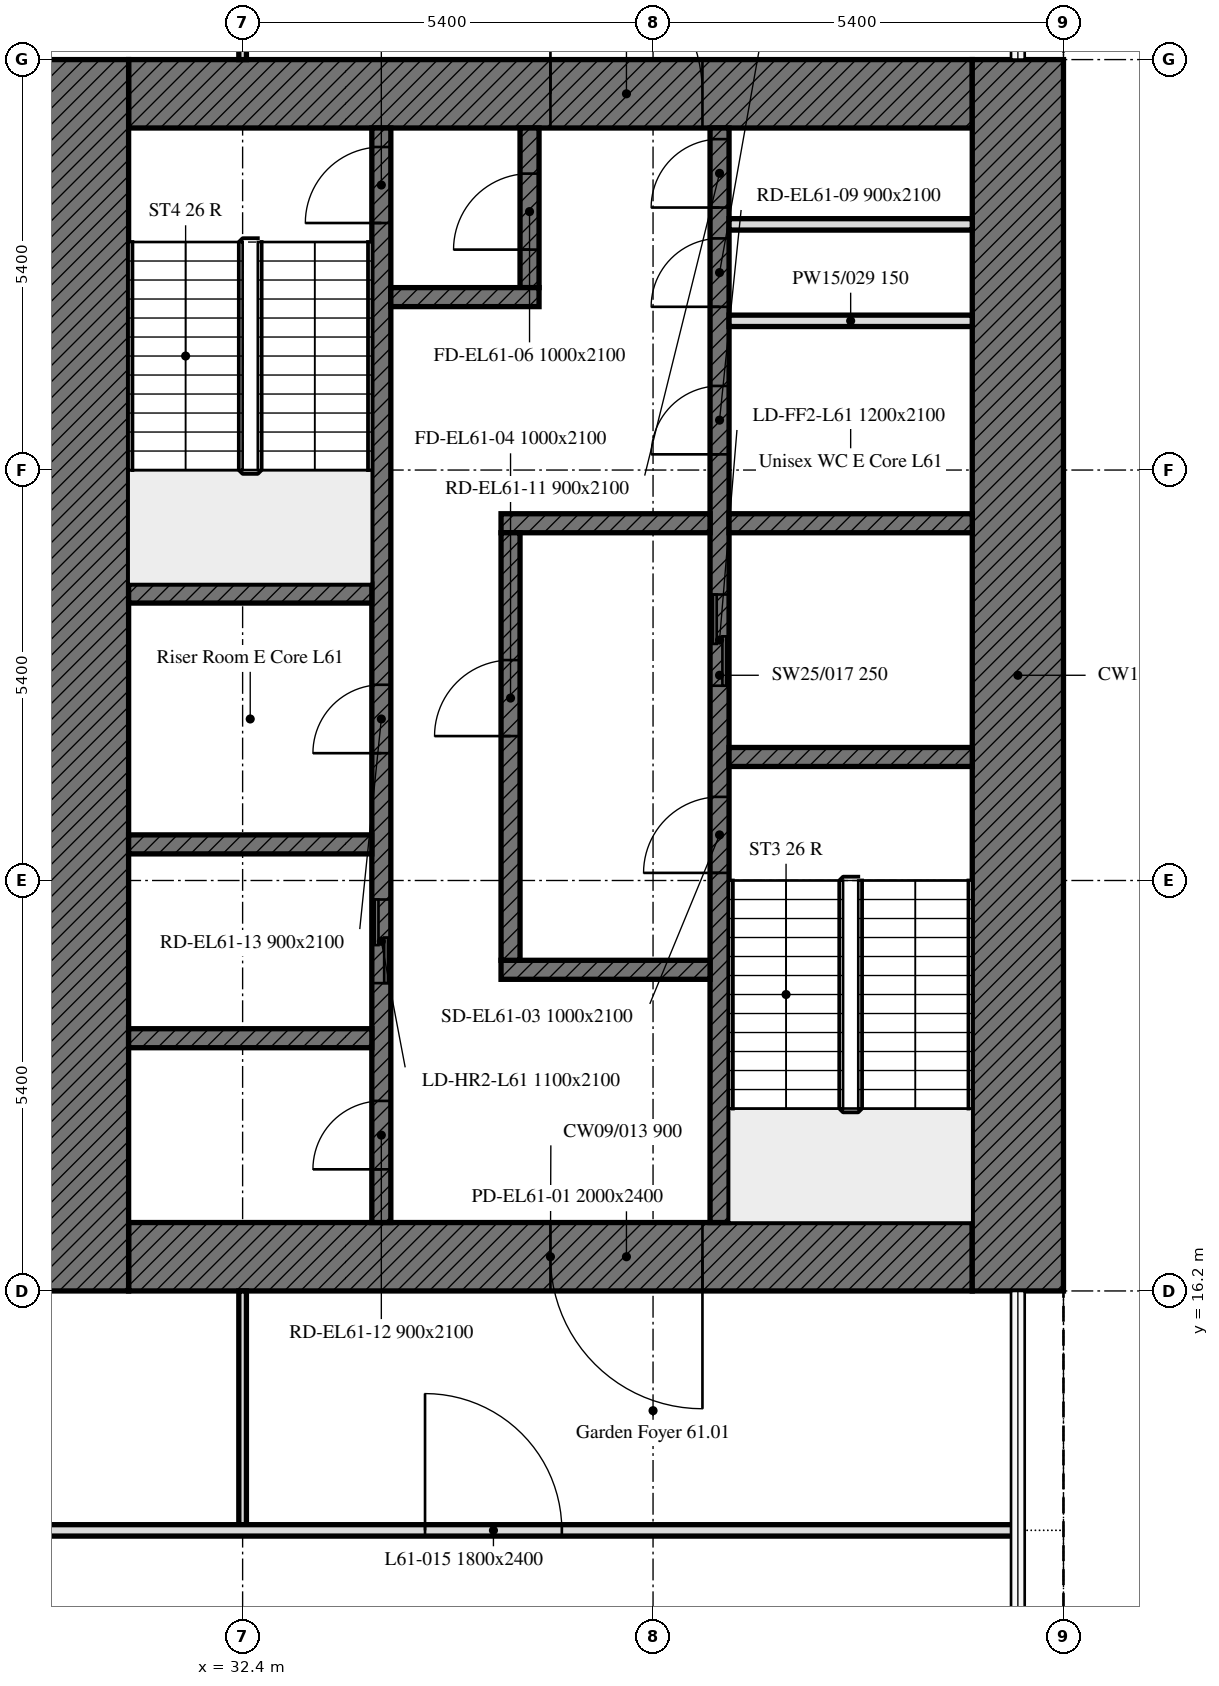
"""IFC4 building model, lengths in metres.
Left out: names, types, materials, properties, quantities, classifications, styles, units other than length and angle.
Written with IfcOpenShell. Run it as: python <this file> out.ifc"""

import sys

from ifc_helpers import new_model, si_unit, direction, frame, frame_2d, origin, place, context, subcontext, project, spatial, rectangle, extrude, element, fill, save


model = new_model("IFC4")
c1 = context("Model", 3, precision=1e-05, world=origin(), true_north=direction((0.0, 1.0)))
c2 = subcontext(c1, "Body", "Model", "MODEL_VIEW")
j1 = project(units=[si_unit("LENGTHUNIT", "METRE"), si_unit("PLANEANGLEUNIT", "RADIAN")], contexts=[c1])
p1 = place(None, origin())
s1 = spatial("IfcSite", under=j1, at=p1, CompositionType="ELEMENT")
p2 = place(p1, origin())
s2 = spatial("IfcBuilding", under=s1, at=p2, CompositionType="ELEMENT")
p3 = place(p2, frame((0.0, 0.0, 250.9)))
s3 = spatial("IfcBuildingStorey", under=s2, at=p3, CompositionType="ELEMENT", Elevation=250.9)
p4 = place(p3, frame((42.0, 16.65, 0.0), z_axis=(0.0, 0.0, 1.0), x_axis=(-1.0, 0.0, 0.0)))
e1 = element("IfcWall", 1, at=p4, inside=s3, PredefinedType="SOLIDWALL", context=c2, shape_type="SweptSolid", body=[
    extrude(rectangle(XDim=11.1, YDim=0.9, at=frame_2d((5.55, 0.0))), origin(), (0.0, 0.0, 1.0), 4.5),
])
p5 = place(p4, frame((3.55, 0.0, 0.0)))
e2 = element("IfcOpeningElement", 2, at=p5, cuts=e1, PredefinedType="OPENING", context=c2, shape_type="SweptSolid", body=[
    extrude(rectangle(XDim=2.0, YDim=2.4, at=frame_2d((1.0, 1.2))), frame((0.0, 0.45, 0.0), z_axis=(0.0, -1.0, 0.0), x_axis=(1.0, 0.0, 0.0)), (0.0, 0.0, 1.0), 0.9),
])
p6 = place(p3, frame((30.9, 31.95, 0.0), z_axis=(0.0, 0.0, 1.0), x_axis=(1.0, 0.0, 0.0)))
e3 = element("IfcWall", 3, at=p6, inside=s3, PredefinedType="SOLIDWALL", context=c2, shape_type="SweptSolid", body=[
    extrude(rectangle(XDim=11.1, YDim=0.9, at=frame_2d((5.55, 0.0))), origin(), (0.0, 0.0, 1.0), 4.5),
])
p7 = place(p6, frame((5.55, 0.0, 0.0)))
e4 = element("IfcOpeningElement", 4, at=p7, cuts=e3, PredefinedType="OPENING", context=c2, shape_type="SweptSolid", body=[
    extrude(rectangle(XDim=2.0, YDim=2.4, at=frame_2d((1.0, 1.2))), frame((0.0, 0.45, 0.0), z_axis=(0.0, -1.0, 0.0), x_axis=(1.0, 0.0, 0.0)), (0.0, 0.0, 1.0), 0.9),
])
for number, where, z_axis, x_axis in (
    (5, (42.6, 32.4, 0.0), (0.0, 0.0, 1.0), (0.0, -1.0, 0.0)),
    (6, (30.3, 16.2, 0.0), (0.0, 0.0, 1.0), (0.0, 1.0, 0.0)),
):
    element("IfcWall", number, at=place(p3, frame(where, z_axis=z_axis, x_axis=x_axis)), inside=s3, PredefinedType="SOLIDWALL", context=c2, shape_type="SweptSolid", body=[
        extrude(rectangle(XDim=16.2, YDim=1.2, at=frame_2d((8.1, 0.0))), origin(), (0.0, 0.0, 1.0), 4.5),
    ])
p8 = place(p3, frame((38.675, 17.1, 0.0), z_axis=(0.0, 0.0, 1.0), x_axis=(0.0, 1.0, 0.0)))
e7 = element("IfcWall", 7, at=p8, inside=s3, PredefinedType="SOLIDWALL", context=c2, shape_type="SweptSolid", body=[
    extrude(rectangle(XDim=14.4, YDim=0.25, at=frame_2d((7.2, 0.0))), origin(), (0.0, 0.0, 1.0), 4.5),
])
p9 = place(p8, frame((4.6, 0.0, 0.0)))
e8 = element("IfcOpeningElement", 8, at=p9, cuts=e7, PredefinedType="OPENING", context=c2, shape_type="SweptSolid", body=[
    extrude(rectangle(XDim=1.0, YDim=2.1, at=frame_2d((0.5, 1.05))), frame((0.0, 0.125, 0.0), z_axis=(0.0, -1.0, 0.0), x_axis=(1.0, 0.0, 0.0)), (0.0, 0.0, 1.0), 0.25),
])
p10 = place(p8, frame((7.062, 0.0, 0.0)))
e9 = element("IfcOpeningElement", 9, at=p10, cuts=e7, PredefinedType="OPENING", context=c2, shape_type="SweptSolid", body=[
    extrude(rectangle(XDim=1.2, YDim=2.1, at=frame_2d((0.6, 1.05))), frame((0.0, 0.125, 0.0), z_axis=(0.0, -1.0, 0.0), x_axis=(1.0, 0.0, 0.0)), (0.0, 0.0, 1.0), 0.25),
])
p11 = place(p8, frame((10.106, 0.0, 0.0)))
e10 = element("IfcOpeningElement", 10, at=p11, cuts=e7, PredefinedType="OPENING", context=c2, shape_type="SweptSolid", body=[
    extrude(rectangle(XDim=0.9, YDim=2.1, at=frame_2d((0.45, 1.05))), frame((0.0, 0.125, 0.0), z_axis=(0.0, -1.0, 0.0), x_axis=(1.0, 0.0, 0.0)), (0.0, 0.0, 1.0), 0.25),
])
p12 = place(p8, frame((12.048, 0.0, 0.0)))
e11 = element("IfcOpeningElement", 11, at=p12, cuts=e7, PredefinedType="OPENING", context=c2, shape_type="SweptSolid", body=[
    extrude(rectangle(XDim=0.9, YDim=2.1, at=frame_2d((0.45, 1.05))), frame((0.0, 0.125, 0.0), z_axis=(0.0, -1.0, 0.0), x_axis=(1.0, 0.0, 0.0)), (0.0, 0.0, 1.0), 0.25),
])
p13 = place(p8, frame((13.354, 0.0, 0.0)))
e12 = element("IfcOpeningElement", 12, at=p13, cuts=e7, PredefinedType="OPENING", context=c2, shape_type="SweptSolid", body=[
    extrude(rectangle(XDim=0.9, YDim=2.1, at=frame_2d((0.45, 1.05))), frame((0.0, 0.125, 0.0), z_axis=(0.0, -1.0, 0.0), x_axis=(1.0, 0.0, 0.0)), (0.0, 0.0, 1.0), 0.25),
])
p14 = place(p3, frame((34.225, 17.1, 0.0), z_axis=(0.0, 0.0, 1.0), x_axis=(0.0, 1.0, 0.0)))
e13 = element("IfcWall", 13, at=p14, inside=s3, PredefinedType="SOLIDWALL", context=c2, shape_type="SweptSolid", body=[
    extrude(rectangle(XDim=14.4, YDim=0.25, at=frame_2d((7.2, 0.0))), origin(), (0.0, 0.0, 1.0), 4.5),
])
p15 = place(p14, frame((13.15, 0.0, 0.0)))
e14 = element("IfcOpeningElement", 14, at=p15, cuts=e13, PredefinedType="OPENING", context=c2, shape_type="SweptSolid", body=[
    extrude(rectangle(XDim=1.0, YDim=2.1, at=frame_2d((0.5, 1.05))), frame((0.0, 0.125, 0.0), z_axis=(0.0, -1.0, 0.0), x_axis=(1.0, 0.0, 0.0)), (0.0, 0.0, 1.0), 0.25),
])
p16 = place(p14, frame((3.15, 0.0, 0.0)))
e15 = element("IfcOpeningElement", 15, at=p16, cuts=e13, PredefinedType="OPENING", context=c2, shape_type="SweptSolid", body=[
    extrude(rectangle(XDim=1.1, YDim=2.1, at=frame_2d((0.55, 1.05))), frame((0.0, 0.125, 0.0), z_axis=(0.0, -1.0, 0.0), x_axis=(1.0, 0.0, 0.0)), (0.0, 0.0, 1.0), 0.25),
])
p17 = place(p14, frame((0.7, 0.0, 0.0)))
e16 = element("IfcOpeningElement", 16, at=p17, cuts=e13, PredefinedType="OPENING", context=c2, shape_type="SweptSolid", body=[
    extrude(rectangle(XDim=0.9, YDim=2.1, at=frame_2d((0.45, 1.05))), frame((0.0, 0.125, 0.0), z_axis=(0.0, -1.0, 0.0), x_axis=(1.0, 0.0, 0.0)), (0.0, 0.0, 1.0), 0.25),
])
p18 = place(p14, frame((6.175, 0.0, 0.0)))
e17 = element("IfcOpeningElement", 17, at=p18, cuts=e13, PredefinedType="OPENING", context=c2, shape_type="SweptSolid", body=[
    extrude(rectangle(XDim=0.9, YDim=2.1, at=frame_2d((0.45, 1.05))), frame((0.0, 0.125, 0.0), z_axis=(0.0, -1.0, 0.0), x_axis=(1.0, 0.0, 0.0)), (0.0, 0.0, 1.0), 0.25),
])
p19 = place(p3, frame((38.8, 23.225, 0.0), z_axis=(0.0, 0.0, 1.0), x_axis=(1.0, 0.0, 0.0)))
e18 = element("IfcWall", 18, at=p19, inside=s3, PredefinedType="SOLIDWALL", context=c2, shape_type="SweptSolid", body=[
    extrude(rectangle(XDim=3.2, YDim=0.25, at=frame_2d((1.6, 0.0))), origin(), (0.0, 0.0, 1.0), 4.5),
])
for number, where, z_axis, x_axis in (
    (19, (30.9, 25.375, 0.0), (0.0, 0.0, 1.0), (1.0, 0.0, 0.0)),
    (20, (30.9, 22.075, 0.0), (0.0, 0.0, 1.0), (1.0, 0.0, 0.0)),
):
    element("IfcWall", number, at=place(p3, frame(where, z_axis=z_axis, x_axis=x_axis)), inside=s3, PredefinedType="SOLIDWALL", context=c2, shape_type="SweptSolid", body=[
        extrude(rectangle(XDim=3.2, YDim=0.25, at=frame_2d((1.6, 0.0))), origin(), (0.0, 0.0, 1.0), 4.5),
    ])
p20 = place(p3, frame((38.8, 26.3, 0.0), z_axis=(0.0, 0.0, 1.0), x_axis=(1.0, 0.0, 0.0)))
e21 = element("IfcWall", 21, at=p20, inside=s3, PredefinedType="SOLIDWALL", context=c2, shape_type="SweptSolid", body=[
    extrude(rectangle(XDim=3.2, YDim=0.25, at=frame_2d((1.6, 0.0))), origin(), (0.0, 0.0, 1.0), 4.5),
])
for number, where, z_axis, x_axis in (
    (22, (35.8, 26.3, 0.0), (0.0, 0.0, 1.0), (1.0, 0.0, 0.0)),
    (23, (35.8, 20.425, 0.0), (0.0, 0.0, 1.0), (1.0, 0.0, 0.0)),
):
    element("IfcWall", number, at=place(p3, frame(where, z_axis=z_axis, x_axis=x_axis)), inside=s3, PredefinedType="SOLIDWALL", context=c2, shape_type="SweptSolid", body=[
        extrude(rectangle(XDim=2.75, YDim=0.25, at=frame_2d((1.375, 0.0))), origin(), (0.0, 0.0, 1.0), 4.5),
    ])
p21 = place(p3, frame((36.175, 29.4, 0.0), z_axis=(0.0, 0.0, 1.0), x_axis=(0.0, 1.0, 0.0)))
e24 = element("IfcWall", 24, at=p21, inside=s3, PredefinedType="SOLIDWALL", context=c2, shape_type="SweptSolid", body=[
    extrude(rectangle(XDim=2.1, YDim=0.25, at=frame_2d((1.05, 0.0))), origin(), (0.0, 0.0, 1.0), 4.5),
])
p22 = place(p21, frame((0.5, 0.0, 0.0)))
e25 = element("IfcOpeningElement", 25, at=p22, cuts=e24, PredefinedType="OPENING", context=c2, shape_type="SweptSolid", body=[
    extrude(rectangle(XDim=1.0, YDim=2.1, at=frame_2d((0.5, 1.05))), frame((0.0, 0.125, 0.0), z_axis=(0.0, -1.0, 0.0), x_axis=(1.0, 0.0, 0.0)), (0.0, 0.0, 1.0), 0.25),
])
p23 = place(p3, frame((34.35, 29.275, 0.0), z_axis=(0.0, 0.0, 1.0), x_axis=(1.0, 0.0, 0.0)))
e26 = element("IfcWall", 26, at=p23, inside=s3, PredefinedType="SOLIDWALL", context=c2, shape_type="SweptSolid", body=[
    extrude(rectangle(XDim=1.95, YDim=0.25, at=frame_2d((0.975, 0.0))), origin(), (0.0, 0.0, 1.0), 4.5),
])
p24 = place(p3, frame((35.925, 20.55, 0.0), z_axis=(0.0, 0.0, 1.0), x_axis=(0.0, 1.0, 0.0)))
e27 = element("IfcWall", 27, at=p24, inside=s3, PredefinedType="SOLIDWALL", context=c2, shape_type="SweptSolid", body=[
    extrude(rectangle(XDim=5.625, YDim=0.25, at=frame_2d((2.812, 0.0))), origin(), (0.0, 0.0, 1.0), 4.5),
])
p25 = place(p24, frame((2.95, 0.0, 0.0)))
e28 = element("IfcOpeningElement", 28, at=p25, cuts=e27, PredefinedType="OPENING", context=c2, shape_type="SweptSolid", body=[
    extrude(rectangle(XDim=1.0, YDim=2.1, at=frame_2d((0.5, 1.05))), frame((0.0, 0.125, 0.0), z_axis=(0.0, -1.0, 0.0), x_axis=(1.0, 0.0, 0.0)), (0.0, 0.0, 1.0), 0.25),
])
p26 = place(p3, frame((30.9, 19.525, 0.0), z_axis=(0.0, 0.0, 1.0), x_axis=(1.0, 0.0, 0.0)))
e29 = element("IfcWall", 29, at=p26, inside=s3, PredefinedType="SOLIDWALL", context=c2, shape_type="SweptSolid", body=[
    extrude(rectangle(XDim=3.2, YDim=0.25, at=frame_2d((1.6, 0.0))), origin(), (0.0, 0.0, 1.0), 4.5),
])
for number, where, z_axis, x_axis in (
    (30, (38.8, 28.963, 0.0), (0.0, 0.0, 1.0), (1.0, 0.0, 0.0)),
    (31, (38.8, 30.232, 0.0), (0.0, 0.0, 1.0), (1.0, 0.0, 0.0)),
):
    element("IfcWall", number, at=place(p3, frame(where, z_axis=z_axis, x_axis=x_axis)), inside=s3, PredefinedType="PARTITIONING", context=c2, shape_type="SweptSolid", body=[
        extrude(rectangle(XDim=3.2, YDim=0.15, at=frame_2d((1.6, 0.0))), origin(), (0.0, 0.0, 1.0), 4.5),
    ])
p27 = place(p3, frame((32.4, 32.4, 0.0), z_axis=(0.0, 0.0, 1.0), x_axis=(0.0, 1.0, 0.0)))
e32 = element("IfcWall", 32, at=p27, inside=s3, PredefinedType="PARTITIONING", context=c2, shape_type="SweptSolid", body=[
    extrude(rectangle(XDim=3.075, YDim=0.1, at=frame_2d((1.538, 0.0))), origin(), (0.0, 0.0, 1.0), 4.5),
])
p28 = place(p3, frame((32.4, 13.125, 0.0), z_axis=(0.0, 0.0, 1.0), x_axis=(0.0, 1.0, 0.0)))
e33 = element("IfcWall", 33, at=p28, inside=s3, PredefinedType="PARTITIONING", context=c2, shape_type="SweptSolid", body=[
    extrude(rectangle(XDim=3.075, YDim=0.1, at=frame_2d((1.538, 0.0))), origin(), (0.0, 0.0, 1.0), 3.75),
])
p29 = place(p3, frame((6.151, 13.05, 0.0), z_axis=(0.0, 0.0, 1.0), x_axis=(1.0, 0.0, 0.0)))
e34 = element("IfcWall", 34, at=p29, inside=s3, PredefinedType="PARTITIONING", context=c2, shape_type="SweptSolid", body=[
    extrude(rectangle(XDim=36.449, YDim=0.15, at=frame_2d((18.225, 0.0))), origin(), (0.0, 0.0, 1.0), 3.75),
])
p30 = place(p29, frame((17.849, 0.0, 0.0)))
e35 = element("IfcOpeningElement", 35, at=p30, cuts=e34, PredefinedType="OPENING", context=c2, shape_type="SweptSolid", body=[
    extrude(rectangle(XDim=1.8, YDim=2.4, at=frame_2d((0.9, 1.2))), frame((0.0, 0.075, 0.0), z_axis=(0.0, -1.0, 0.0), x_axis=(1.0, 0.0, 0.0)), (0.0, 0.0, 1.0), 0.15),
])
p31 = place(p29, frame((11.849, 0.0, 0.0)))
e36 = element("IfcOpeningElement", 36, at=p31, cuts=e34, PredefinedType="OPENING", context=c2, shape_type="SweptSolid", body=[
    extrude(rectangle(XDim=1.8, YDim=2.4, at=frame_2d((0.9, 1.2))), frame((0.0, 0.075, 0.0), z_axis=(0.0, -1.0, 0.0), x_axis=(1.0, 0.0, 0.0)), (0.0, 0.0, 1.0), 0.15),
])
p32 = place(p29, frame((28.649, 0.0, 0.0)))
e37 = element("IfcOpeningElement", 37, at=p32, cuts=e34, PredefinedType="OPENING", context=c2, shape_type="SweptSolid", body=[
    extrude(rectangle(XDim=1.8, YDim=2.4, at=frame_2d((0.9, 1.2))), frame((0.0, 0.075, 0.0), z_axis=(0.0, -1.0, 0.0), x_axis=(1.0, 0.0, 0.0)), (0.0, 0.0, 1.0), 0.15),
])
p33 = place(p29, frame((1.649, 0.0, 0.0)))
e38 = element("IfcOpeningElement", 38, at=p33, cuts=e34, PredefinedType="OPENING", context=c2, shape_type="SweptSolid", body=[
    extrude(rectangle(XDim=1.8, YDim=2.4, at=frame_2d((0.9, 1.2))), frame((0.0, 0.075, 0.0), z_axis=(0.0, -1.0, 0.0), x_axis=(1.0, 0.0, 0.0)), (0.0, 0.0, 1.0), 0.15),
])
p34 = place(p5, origin())
e39 = element("IfcDoor", 39, at=p34, inside=s3, OperationType="DOUBLE_DOOR_SINGLE_SWING", PredefinedType="DOOR", context=c2, shape_type="SweptSolid", body=[
    extrude(rectangle(XDim=2.0, YDim=2.4, at=frame_2d((1.0, 1.2))), frame((0.0, 0.025, 0.0), z_axis=(0.0, -1.0, 0.0), x_axis=(1.0, 0.0, 0.0)), (0.0, 0.0, 1.0), 0.05),
])
fill(e2, e39)
p35 = place(p7, origin())
e40 = element("IfcDoor", 40, at=p35, inside=s3, OperationType="DOUBLE_DOOR_SINGLE_SWING", PredefinedType="DOOR", context=c2, shape_type="SweptSolid", body=[
    extrude(rectangle(XDim=2.0, YDim=2.4, at=frame_2d((1.0, 1.2))), frame((0.0, 0.025, 0.0), z_axis=(0.0, -1.0, 0.0), x_axis=(1.0, 0.0, 0.0)), (0.0, 0.0, 1.0), 0.05),
])
fill(e4, e40)
p36 = place(p9, origin())
e41 = element("IfcDoor", 41, at=p36, inside=s3, OperationType="SINGLE_SWING_LEFT", PredefinedType="DOOR", context=c2, shape_type="SweptSolid", body=[
    extrude(rectangle(XDim=1.0, YDim=2.1, at=frame_2d((0.5, 1.05))), frame((0.0, 0.025, 0.0), z_axis=(0.0, -1.0, 0.0), x_axis=(1.0, 0.0, 0.0)), (0.0, 0.0, 1.0), 0.05),
])
fill(e8, e41)
p37 = place(p25, origin())
e42 = element("IfcDoor", 42, at=p37, inside=s3, OperationType="SINGLE_SWING_LEFT", PredefinedType="DOOR", context=c2, shape_type="SweptSolid", body=[
    extrude(rectangle(XDim=1.0, YDim=2.1, at=frame_2d((0.5, 1.05))), frame((0.0, 0.025, 0.0), z_axis=(0.0, -1.0, 0.0), x_axis=(1.0, 0.0, 0.0)), (0.0, 0.0, 1.0), 0.05),
])
fill(e28, e42)
p38 = place(p15, origin())
e43 = element("IfcDoor", 43, at=p38, inside=s3, OperationType="SINGLE_SWING_LEFT", PredefinedType="DOOR", context=c2, shape_type="SweptSolid", body=[
    extrude(rectangle(XDim=1.0, YDim=2.1, at=frame_2d((0.5, 1.05))), frame((0.0, 0.025, 0.0), z_axis=(0.0, -1.0, 0.0), x_axis=(1.0, 0.0, 0.0)), (0.0, 0.0, 1.0), 0.05),
])
fill(e14, e43)
p39 = place(p22, origin())
e44 = element("IfcDoor", 44, at=p39, inside=s3, OperationType="SINGLE_SWING_LEFT", PredefinedType="DOOR", context=c2, shape_type="SweptSolid", body=[
    extrude(rectangle(XDim=1.0, YDim=2.1, at=frame_2d((0.5, 1.05))), frame((0.0, 0.025, 0.0), z_axis=(0.0, -1.0, 0.0), x_axis=(1.0, 0.0, 0.0)), (0.0, 0.0, 1.0), 0.05),
])
fill(e25, e44)
p40 = place(p10, origin())
e45 = element("IfcDoor", 45, at=p40, inside=s3, OperationType="DOUBLE_DOOR_SLIDING", PredefinedType="DOOR", context=c2, shape_type="SweptSolid", body=[
    extrude(rectangle(XDim=1.2, YDim=2.1, at=frame_2d((0.6, 1.05))), frame((0.0, 0.025, 0.0), z_axis=(0.0, -1.0, 0.0), x_axis=(1.0, 0.0, 0.0)), (0.0, 0.0, 1.0), 0.05),
])
fill(e9, e45)
p41 = place(p16, origin())
e46 = element("IfcDoor", 46, at=p41, inside=s3, OperationType="DOUBLE_DOOR_SLIDING", PredefinedType="DOOR", context=c2, shape_type="SweptSolid", body=[
    extrude(rectangle(XDim=1.1, YDim=2.1, at=frame_2d((0.55, 1.05))), frame((0.0, 0.025, 0.0), z_axis=(0.0, -1.0, 0.0), x_axis=(1.0, 0.0, 0.0)), (0.0, 0.0, 1.0), 0.05),
])
fill(e15, e46)
p42 = place(p11, origin())
e47 = element("IfcDoor", 47, at=p42, inside=s3, OperationType="SINGLE_SWING_LEFT", PredefinedType="DOOR", context=c2, shape_type="SweptSolid", body=[
    extrude(rectangle(XDim=0.9, YDim=2.1, at=frame_2d((0.45, 1.05))), frame((0.0, 0.025, 0.0), z_axis=(0.0, -1.0, 0.0), x_axis=(1.0, 0.0, 0.0)), (0.0, 0.0, 1.0), 0.05),
])
fill(e10, e47)
p43 = place(p12, origin())
e48 = element("IfcDoor", 48, at=p43, inside=s3, OperationType="SINGLE_SWING_LEFT", PredefinedType="DOOR", context=c2, shape_type="SweptSolid", body=[
    extrude(rectangle(XDim=0.9, YDim=2.1, at=frame_2d((0.45, 1.05))), frame((0.0, 0.025, 0.0), z_axis=(0.0, -1.0, 0.0), x_axis=(1.0, 0.0, 0.0)), (0.0, 0.0, 1.0), 0.05),
])
fill(e11, e48)
p44 = place(p13, origin())
e49 = element("IfcDoor", 49, at=p44, inside=s3, OperationType="SINGLE_SWING_LEFT", PredefinedType="DOOR", context=c2, shape_type="SweptSolid", body=[
    extrude(rectangle(XDim=0.9, YDim=2.1, at=frame_2d((0.45, 1.05))), frame((0.0, 0.025, 0.0), z_axis=(0.0, -1.0, 0.0), x_axis=(1.0, 0.0, 0.0)), (0.0, 0.0, 1.0), 0.05),
])
fill(e12, e49)
p45 = place(p17, origin())
e50 = element("IfcDoor", 50, at=p45, inside=s3, OperationType="SINGLE_SWING_LEFT", PredefinedType="DOOR", context=c2, shape_type="SweptSolid", body=[
    extrude(rectangle(XDim=0.9, YDim=2.1, at=frame_2d((0.45, 1.05))), frame((0.0, 0.025, 0.0), z_axis=(0.0, -1.0, 0.0), x_axis=(1.0, 0.0, 0.0)), (0.0, 0.0, 1.0), 0.05),
])
fill(e16, e50)
p46 = place(p18, origin())
e51 = element("IfcDoor", 51, at=p46, inside=s3, OperationType="SINGLE_SWING_LEFT", PredefinedType="DOOR", context=c2, shape_type="SweptSolid", body=[
    extrude(rectangle(XDim=0.9, YDim=2.1, at=frame_2d((0.45, 1.05))), frame((0.0, 0.025, 0.0), z_axis=(0.0, -1.0, 0.0), x_axis=(1.0, 0.0, 0.0)), (0.0, 0.0, 1.0), 0.05),
])
fill(e17, e51)
p47 = place(p32, origin())
e52 = element("IfcDoor", 52, at=p47, inside=s3, OperationType="DOUBLE_DOOR_SINGLE_SWING", PredefinedType="DOOR", context=c2, shape_type="SweptSolid", body=[
    extrude(rectangle(XDim=1.8, YDim=2.4, at=frame_2d((0.9, 1.2))), frame((0.0, 0.025, 0.0), z_axis=(0.0, -1.0, 0.0), x_axis=(1.0, 0.0, 0.0)), (0.0, 0.0, 1.0), 0.05),
])
fill(e37, e52)
save(model, sys.argv[1])
